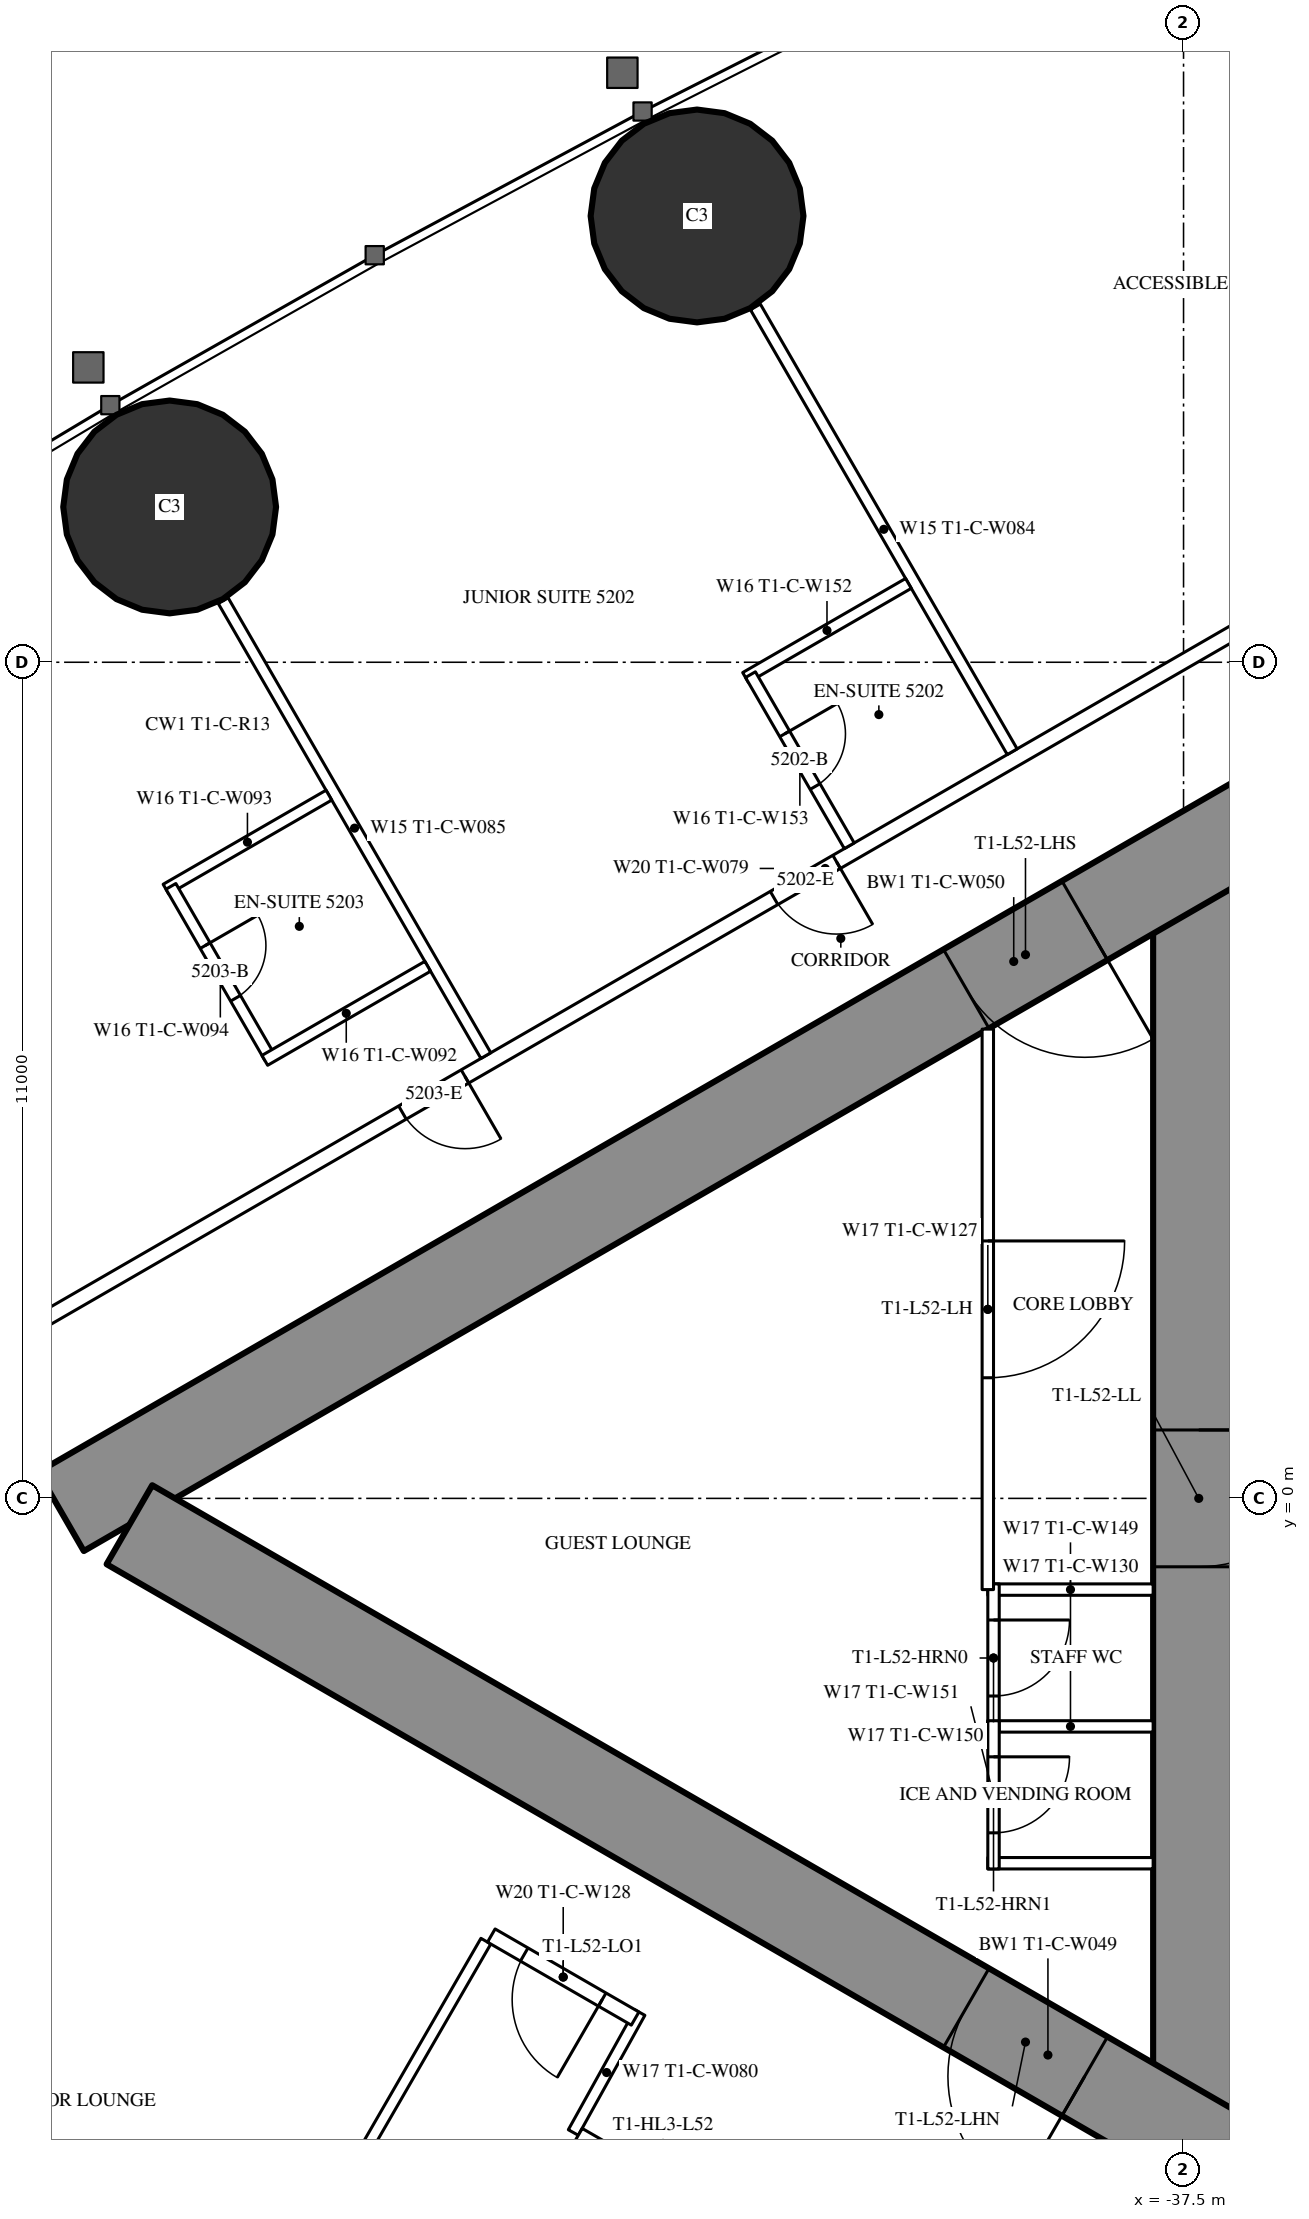
"""IFC4 building model, lengths in metres.
Left out: names, types, materials, properties, quantities, classifications, styles, units other than length and angle.
Written with IfcOpenShell. Run it as: python <this file> out.ifc"""

import sys

from ifc_helpers import new_model, si_unit, direction, frame, frame_2d, origin, origin_2d, place, context, subcontext, project, spatial, rectangle, circle, extrude, element, fill, save


model = new_model("IFC4")
c1 = context("Model", 3, precision=1e-05, world=origin(), true_north=direction((0.0, 1.0)))
c2 = subcontext(c1, "Body", "Model", "MODEL_VIEW")
j1 = project(units=[si_unit("LENGTHUNIT", "METRE"), si_unit("PLANEANGLEUNIT", "RADIAN")], contexts=[c1])
p1 = place(None, origin())
s1 = spatial("IfcSite", under=j1, at=p1, CompositionType="ELEMENT")
p2 = place(p1, origin())
s2 = spatial("IfcBuilding", under=s1, at=p2, CompositionType="ELEMENT")
p3 = place(p2, frame((0.0, 0.0, 194.8)))
s3 = spatial("IfcBuildingStorey", under=s2, at=p3, CompositionType="ELEMENT", Elevation=194.8)
for number, where, z_axis, x_axis in (
    (1, (-43.9, 16.871, 0.0), (0.0, 0.0, 1.0), (1.0, 0.0, 0.0)),
    (2, (-50.839, 13.043, 0.0), (0.0, 0.0, 1.0), (1.0, 0.0, 0.0)),
):
    element("IfcColumn", number, at=place(p3, frame(where, z_axis=z_axis, x_axis=x_axis)), inside=s3, PredefinedType="COLUMN", context=c2, shape_type="SweptSolid", body=[
        extrude(circle(Radius=1.4, at=origin_2d()), origin(), (0.0, 0.0, 1.0), 3.5),
    ])
p4 = place(p3, frame((-37.3, 8.6, 0.0), z_axis=(0.0, 0.0, 1.0), x_axis=(0.0, -1.0, 0.0)))
e3 = element("IfcWall", 3, at=p4, inside=s3, PredefinedType="SHEAR", context=c2, shape_type="SweptSolid", body=[
    extrude(rectangle(XDim=17.2, YDim=1.2, at=frame_2d((8.6, 0.0))), origin(), (0.0, 0.0, 1.0), 3.5),
])
p5 = place(p4, frame((7.7, 0.0, 0.0)))
e4 = element("IfcOpeningElement", 4, at=p5, cuts=e3, PredefinedType="OPENING", context=c2, shape_type="SweptSolid", body=[
    extrude(rectangle(XDim=1.8, YDim=2.2, at=frame_2d((0.9, 1.1))), frame((0.0, 0.61, 0.0), z_axis=(0.0, -1.0, 0.0), x_axis=(1.0, 0.0, 0.0)), (0.0, 0.0, 1.0), 1.22),
])
p6 = place(p3, frame((-27.2, 14.3, 0.0), z_axis=(0.0, 0.0, 1.0), x_axis=(-0.866026593062, -0.499997940104, 0.0)))
e5 = element("IfcWall", 5, at=p6, inside=s3, PredefinedType="SHEAR", context=c2, shape_type="SweptSolid", body=[
    extrude(rectangle(XDim=28.946, YDim=1.2, at=frame_2d((14.473, 0.0))), origin(), (0.0, 0.0, 1.0), 3.5),
])
p7 = place(p6, frame((4.6, 0.0, 0.0)))
e6 = element("IfcOpeningElement", 6, at=p7, cuts=e5, PredefinedType="OPENING", context=c2, shape_type="SweptSolid", body=[
    extrude(rectangle(XDim=1.0, YDim=2.2, at=frame_2d((0.5, 1.1))), frame((0.0, 0.61, 0.0), z_axis=(0.0, -1.0, 0.0), x_axis=(1.0, 0.0, 0.0)), (0.0, 0.0, 1.0), 1.22),
])
p8 = place(p6, frame((13.395, 0.0, 0.0)))
e7 = element("IfcOpeningElement", 7, at=p8, cuts=e5, PredefinedType="OPENING", context=c2, shape_type="SweptSolid", body=[
    extrude(rectangle(XDim=1.8, YDim=2.2, at=frame_2d((0.9, 1.1))), frame((0.0, 0.61, 0.0), z_axis=(0.0, -1.0, 0.0), x_axis=(1.0, 0.0, 0.0)), (0.0, 0.0, 1.0), 1.22),
])
p9 = place(p3, frame((-27.2, -14.3, 0.0), z_axis=(0.0, 0.0, 1.0), x_axis=(-0.866024021859, 0.500002393557, 0.0)))
e8 = element("IfcWall", 8, at=p9, inside=s3, PredefinedType="SHEAR", context=c2, shape_type="SweptSolid", body=[
    extrude(rectangle(XDim=27.907, YDim=1.2, at=frame_2d((13.954, 0.0))), origin(), (0.0, 0.0, 1.0), 3.5),
])
p10 = place(p9, frame((4.6, 0.0, 0.0)))
e9 = element("IfcOpeningElement", 9, at=p10, cuts=e8, PredefinedType="OPENING", context=c2, shape_type="SweptSolid", body=[
    extrude(rectangle(XDim=1.0, YDim=2.2, at=frame_2d((0.5, 1.1))), frame((0.0, 0.61, 0.0), z_axis=(0.0, -1.0, 0.0), x_axis=(1.0, 0.0, 0.0)), (0.0, 0.0, 1.0), 1.22),
])
p11 = place(p9, frame((13.395, 0.0, 0.0)))
e10 = element("IfcOpeningElement", 10, at=p11, cuts=e8, PredefinedType="OPENING", context=c2, shape_type="SweptSolid", body=[
    extrude(rectangle(XDim=1.8, YDim=2.2, at=frame_2d((0.9, 1.1))), frame((0.0, 0.61, 0.0), z_axis=(0.0, -1.0, 0.0), x_axis=(1.0, 0.0, 0.0)), (0.0, 0.0, 1.0), 1.22),
])
p12 = place(p3, frame((-27.86, 16.575, 0.0), z_axis=(0.0, 0.0, 1.0), x_axis=(-0.866025533911, -0.499999774615, 0.0)))
e11 = element("IfcWall", 11, at=p12, inside=s3, PredefinedType="PARTITIONING", context=c2, shape_type="SweptSolid", body=[
    extrude(rectangle(XDim=33.149, YDim=0.2, at=frame_2d((16.575, 0.0))), origin(), (0.0, 0.0, 1.0), 3.25),
])
p13 = place(p12, frame((3.75, 0.0, 0.0)))
e12 = element("IfcOpeningElement", 12, at=p13, cuts=e11, PredefinedType="OPENING", context=c2, shape_type="SweptSolid", body=[
    extrude(rectangle(XDim=1.0, YDim=2.2, at=frame_2d((0.5, 1.1))), frame((0.0, 0.11, 0.0), z_axis=(0.0, -1.0, 0.0), x_axis=(1.0, 0.0, 0.0)), (0.0, 0.0, 1.0), 0.22),
])
p14 = place(p12, frame((16.402, 0.0, 0.0)))
e13 = element("IfcOpeningElement", 13, at=p14, cuts=e11, PredefinedType="OPENING", context=c2, shape_type="SweptSolid", body=[
    extrude(rectangle(XDim=0.95, YDim=2.2, at=frame_2d((0.475, 1.1))), frame((0.0, 0.11, 0.0), z_axis=(0.0, -1.0, 0.0), x_axis=(1.0, 0.0, 0.0)), (0.0, 0.0, 1.0), 0.22),
])
p15 = place(p12, frame((22.047, 0.0, 0.0)))
e14 = element("IfcOpeningElement", 14, at=p15, cuts=e11, PredefinedType="OPENING", context=c2, shape_type="SweptSolid", body=[
    extrude(rectangle(XDim=0.95, YDim=2.2, at=frame_2d((0.475, 1.1))), frame((0.0, 0.11, 0.0), z_axis=(0.0, -1.0, 0.0), x_axis=(1.0, 0.0, 0.0)), (0.0, 0.0, 1.0), 0.22),
])
p16 = place(p12, frame((30.396, 0.0, 0.0)))
e15 = element("IfcOpeningElement", 15, at=p16, cuts=e11, PredefinedType="OPENING", context=c2, shape_type="SweptSolid", body=[
    extrude(rectangle(XDim=1.8, YDim=2.2, at=frame_2d((0.9, 1.1))), frame((0.0, 0.11, 0.0), z_axis=(0.0, -1.0, 0.0), x_axis=(1.0, 0.0, 0.0)), (0.0, 0.0, 1.0), 0.22),
])
p17 = place(p3, frame((-39.754, 9.823, 0.0), z_axis=(0.0, 0.0, 1.0), x_axis=(-0.499997670926, 0.866026748472, 0.0)))
e16 = element("IfcWall", 16, at=p17, inside=s3, PredefinedType="PARTITIONING", context=c2, shape_type="SweptSolid", body=[
    extrude(rectangle(XDim=6.757, YDim=0.15, at=frame_2d((3.379, 0.0))), origin(), (0.0, 0.0, 1.0), 2.3),
])
for number, where, z_axis, x_axis in (
    (17, (-46.679, 5.825, 0.0), (0.0, 0.0, 1.0), (-0.5, 0.866, 0.0)),
    (18, (-46.679, -5.825, 0.0), (0.0, 0.0, 1.0), (-0.5, -0.866, 0.0)),
):
    element("IfcWall", number, at=place(p3, frame(where, z_axis=z_axis, x_axis=x_axis)), inside=s3, PredefinedType="PARTITIONING", context=c2, shape_type="SweptSolid", body=[
        extrude(rectangle(XDim=6.911, YDim=0.15, at=frame_2d((3.456, 0.0))), origin(), (0.0, 0.0, 1.0), 2.3),
    ])
p18 = place(p3, frame((-44.652, -6.764, 0.0), z_axis=(0.0, 0.0, 1.0), x_axis=(-0.485424724123, -0.874278466629, 0.0)))
e19 = element("IfcWall", 19, at=p18, inside=s3, PredefinedType="PARTITIONING", context=c2, shape_type="SweptSolid", body=[
    extrude(rectangle(XDim=1.805, YDim=0.15, at=frame_2d((0.903, 0.0))), origin(), (0.0, 0.0, 1.0), 3.25),
])
p19 = place(p3, frame((-44.715, -6.844, 0.0), z_axis=(0.0, 0.0, 1.0), x_axis=(-0.865999496279, 0.500044870432, 0.0)))
e20 = element("IfcWall", 20, at=p19, inside=s3, PredefinedType="PARTITIONING", context=c2, shape_type="SweptSolid", body=[
    extrude(rectangle(XDim=2.185, YDim=0.2, at=frame_2d((1.092, 0.0))), origin(), (0.0, 0.0, 1.0), 3.25),
])
p20 = place(p19, frame((0.5, 0.0, 0.0)))
e21 = element("IfcOpeningElement", 21, at=p20, cuts=e20, PredefinedType="OPENING", context=c2, shape_type="SweptSolid", body=[
    extrude(rectangle(XDim=1.185, YDim=2.2, at=frame_2d((0.593, 1.1))), frame((0.0, 0.11, 0.0), z_axis=(0.0, -1.0, 0.0), x_axis=(1.0, 0.0, 0.0)), (0.0, 0.0, 1.0), 0.22),
])
p21 = place(p3, frame((-41.119, 12.037, 0.0), z_axis=(0.0, 0.0, 1.0), x_axis=(-0.866073894602, -0.499916002032, 0.0)))
e22 = element("IfcWall", 22, at=p21, inside=s3, PredefinedType="PARTITIONING", context=c2, shape_type="SweptSolid", body=[
    extrude(rectangle(XDim=2.475, YDim=0.15, at=frame_2d((1.238, 0.0))), origin(), (0.0, 0.0, 1.0), 3.25),
])
p22 = place(p3, frame((-41.898, 8.585, 0.0), z_axis=(0.0, 0.0, 1.0), x_axis=(-0.500006934395, 0.866021400173, 0.0)))
e23 = element("IfcWall", 23, at=p22, inside=s3, PredefinedType="PARTITIONING", context=c2, shape_type="SweptSolid", body=[
    extrude(rectangle(XDim=2.6, YDim=0.15, at=frame_2d((1.3, 0.0))), origin(), (0.0, 0.0, 1.0), 3.25),
])
p23 = place(p22, frame((0.9, 0.0, 0.0)))
e24 = element("IfcOpeningElement", 24, at=p23, cuts=e23, PredefinedType="OPENING", context=c2, shape_type="SweptSolid", body=[
    extrude(rectangle(XDim=0.8, YDim=2.2, at=frame_2d((0.4, 1.1))), frame((0.0, 0.085, 0.0), z_axis=(0.0, -1.0, 0.0), x_axis=(1.0, 0.0, 0.0)), (0.0, 0.0, 1.0), 0.17),
])
p24 = place(p3, frame((-48.744, 9.252, 0.0), z_axis=(0.0, 0.0, 1.0), x_axis=(-0.866006523861, -0.500032699561, 0.0)))
e25 = element("IfcWall", 25, at=p24, inside=s3, PredefinedType="PARTITIONING", context=c2, shape_type="SweptSolid", body=[
    extrude(rectangle(XDim=2.475, YDim=0.15, at=frame_2d((1.237, 0.0))), origin(), (0.0, 0.0, 1.0), 3.25),
])
p25 = place(p3, frame((-49.522, 5.8, 0.0), z_axis=(0.0, 0.0, 1.0), x_axis=(-0.500006934395, 0.866021400173, 0.0)))
e26 = element("IfcWall", 26, at=p25, inside=s3, PredefinedType="PARTITIONING", context=c2, shape_type="SweptSolid", body=[
    extrude(rectangle(XDim=2.6, YDim=0.15, at=frame_2d((1.3, 0.0))), origin(), (0.0, 0.0, 1.0), 3.25),
])
p26 = place(p25, frame((0.9, 0.0, 0.0)))
e27 = element("IfcOpeningElement", 27, at=p26, cuts=e26, PredefinedType="OPENING", context=c2, shape_type="SweptSolid", body=[
    extrude(rectangle(XDim=0.8, YDim=2.2, at=frame_2d((0.4, 1.1))), frame((0.0, 0.085, 0.0), z_axis=(0.0, -1.0, 0.0), x_axis=(1.0, 0.0, 0.0)), (0.0, 0.0, 1.0), 0.17),
])
p27 = place(p3, frame((-47.444, 7.0, 0.0), z_axis=(0.0, 0.0, 1.0), x_axis=(-0.866006523861, -0.500032699561, 0.0)))
e28 = element("IfcWall", 28, at=p27, inside=s3, PredefinedType="PARTITIONING", context=c2, shape_type="SweptSolid", body=[
    extrude(rectangle(XDim=2.475, YDim=0.15, at=frame_2d((1.237, 0.0))), origin(), (0.0, 0.0, 1.0), 3.25),
])
for number, where, z_axis, x_axis in (
    (29, (-37.9, -1.2, 0.0), (0.0, 0.0, 1.0), (-1.0, 0.0, 0.0)),
    (30, (-37.9, -3.0, 0.0), (0.0, 0.0, 1.0), (-1.0, 0.0, 0.0)),
    (31, (-37.9, -4.8, 0.0), (0.0, 0.0, 1.0), (-1.0, 0.0, 0.0)),
):
    element("IfcWall", number, at=place(p3, frame(where, z_axis=z_axis, x_axis=x_axis)), inside=s3, PredefinedType="PARTITIONING", context=c2, shape_type="SweptSolid", body=[
        extrude(rectangle(XDim=2.175, YDim=0.15, at=frame_2d((1.087, 0.0))), origin(), (0.0, 0.0, 1.0), 3.25),
    ])
p28 = place(p3, frame((-40.0, -1.125, 0.0), z_axis=(0.0, 0.0, 1.0), x_axis=(0.0, -1.0, 0.0)))
e32 = element("IfcWall", 32, at=p28, inside=s3, PredefinedType="PARTITIONING", context=c2, shape_type="SweptSolid", body=[
    extrude(rectangle(XDim=1.95, YDim=0.15, at=frame_2d((0.975, 0.0))), origin(), (0.0, 0.0, 1.0), 3.25),
])
p29 = place(p28, frame((0.475, 0.0, 0.0)))
e33 = element("IfcOpeningElement", 33, at=p29, cuts=e32, PredefinedType="OPENING", context=c2, shape_type="SweptSolid", body=[
    extrude(rectangle(XDim=1.0, YDim=2.2, at=frame_2d((0.5, 1.1))), frame((0.0, 0.085, 0.0), z_axis=(0.0, -1.0, 0.0), x_axis=(1.0, 0.0, 0.0)), (0.0, 0.0, 1.0), 0.17),
])
p30 = place(p3, frame((-40.0, -2.925, 0.0), z_axis=(0.0, 0.0, 1.0), x_axis=(0.0, -1.0, 0.0)))
e34 = element("IfcWall", 34, at=p30, inside=s3, PredefinedType="PARTITIONING", context=c2, shape_type="SweptSolid", body=[
    extrude(rectangle(XDim=1.95, YDim=0.15, at=frame_2d((0.975, 0.0))), origin(), (0.0, 0.0, 1.0), 3.25),
])
p31 = place(p30, frame((0.475, 0.0, 0.0)))
e35 = element("IfcOpeningElement", 35, at=p31, cuts=e34, PredefinedType="OPENING", context=c2, shape_type="SweptSolid", body=[
    extrude(rectangle(XDim=1.0, YDim=2.2, at=frame_2d((0.5, 1.1))), frame((0.0, 0.085, 0.0), z_axis=(0.0, -1.0, 0.0), x_axis=(1.0, 0.0, 0.0)), (0.0, 0.0, 1.0), 0.17),
])
p32 = place(p3, frame((-40.075, 6.174, 0.0), z_axis=(0.0, 0.0, 1.0), x_axis=(0.0, -1.0, 0.0)))
e36 = element("IfcWall", 36, at=p32, inside=s3, PredefinedType="PARTITIONING", context=c2, shape_type="SweptSolid", body=[
    extrude(rectangle(XDim=7.374, YDim=0.15, at=frame_2d((3.687, 0.0))), origin(), (0.0, 0.0, 1.0), 3.25),
])
p33 = place(p32, frame((2.787, 0.0, 0.0)))
e37 = element("IfcOpeningElement", 37, at=p33, cuts=e36, PredefinedType="OPENING", context=c2, shape_type="SweptSolid", body=[
    extrude(rectangle(XDim=1.8, YDim=2.2, at=frame_2d((0.9, 1.1))), frame((0.0, 0.085, 0.0), z_axis=(0.0, -1.0, 0.0), x_axis=(1.0, 0.0, 0.0)), (0.0, 0.0, 1.0), 0.17),
])
p34 = place(p3, frame((-39.758, -11.697, 0.0), z_axis=(0.0, 0.0, 1.0), x_axis=(-0.866024194504, 0.500002094529, 0.0)))
e38 = element("IfcWall", 38, at=p34, inside=s3, PredefinedType="PARTITIONING", context=c2, shape_type="SweptSolid", body=[
    extrude(rectangle(XDim=6.6, YDim=0.25, at=frame_2d((3.3, 0.0))), origin(), (0.0, 0.0, 1.0), 3.25),
])
p35 = place(p34, frame((0.75, 0.0, 0.0)))
e39 = element("IfcOpeningElement", 39, at=p35, cuts=e38, PredefinedType="OPENING", context=c2, shape_type="SweptSolid", body=[
    extrude(rectangle(XDim=1.1, YDim=2.2, at=frame_2d((0.55, 1.1))), frame((0.0, 0.135, 0.0), z_axis=(0.0, -1.0, 0.0), x_axis=(1.0, 0.0, 0.0)), (0.0, 0.0, 1.0), 0.27),
])
p36 = place(p34, frame((2.75, 0.0, 0.0)))
e40 = element("IfcOpeningElement", 40, at=p36, cuts=e38, PredefinedType="OPENING", context=c2, shape_type="SweptSolid", body=[
    extrude(rectangle(XDim=1.1, YDim=2.2, at=frame_2d((0.55, 1.1))), frame((0.0, 0.135, 0.0), z_axis=(0.0, -1.0, 0.0), x_axis=(1.0, 0.0, 0.0)), (0.0, 0.0, 1.0), 0.27),
])
p37 = place(p34, frame((4.75, 0.0, 0.0)))
e41 = element("IfcOpeningElement", 41, at=p37, cuts=e38, PredefinedType="OPENING", context=c2, shape_type="SweptSolid", body=[
    extrude(rectangle(XDim=1.1, YDim=2.2, at=frame_2d((0.55, 1.1))), frame((0.0, 0.135, 0.0), z_axis=(0.0, -1.0, 0.0), x_axis=(1.0, 0.0, 0.0)), (0.0, 0.0, 1.0), 0.27),
])
p38 = place(p23, origin())
e42 = element("IfcDoor", 42, at=p38, inside=s3, OperationType="SINGLE_SWING_RIGHT", PredefinedType="DOOR", context=c2, shape_type="SweptSolid", body=[
    extrude(rectangle(XDim=0.8, YDim=2.2, at=frame_2d((0.4, 1.1))), frame((0.0, 0.025, 0.0), z_axis=(0.0, -1.0, 0.0), x_axis=(1.0, 0.0, 0.0)), (0.0, 0.0, 1.0), 0.05),
])
fill(e24, e42)
p39 = place(p14, origin())
e43 = element("IfcDoor", 43, at=p39, inside=s3, OperationType="SINGLE_SWING_LEFT", PredefinedType="DOOR", context=c2, shape_type="SweptSolid", body=[
    extrude(rectangle(XDim=0.95, YDim=2.2, at=frame_2d((0.475, 1.1))), frame((0.0, 0.025, 0.0), z_axis=(0.0, -1.0, 0.0), x_axis=(1.0, 0.0, 0.0)), (0.0, 0.0, 1.0), 0.05),
])
fill(e13, e43)
p40 = place(p26, origin())
e44 = element("IfcDoor", 44, at=p40, inside=s3, OperationType="SINGLE_SWING_RIGHT", PredefinedType="DOOR", context=c2, shape_type="SweptSolid", body=[
    extrude(rectangle(XDim=0.8, YDim=2.2, at=frame_2d((0.4, 1.1))), frame((0.0, 0.025, 0.0), z_axis=(0.0, -1.0, 0.0), x_axis=(1.0, 0.0, 0.0)), (0.0, 0.0, 1.0), 0.05),
])
fill(e27, e44)
p41 = place(p15, origin())
e45 = element("IfcDoor", 45, at=p41, inside=s3, OperationType="SINGLE_SWING_LEFT", PredefinedType="DOOR", context=c2, shape_type="SweptSolid", body=[
    extrude(rectangle(XDim=0.95, YDim=2.2, at=frame_2d((0.475, 1.1))), frame((0.0, 0.025, 0.0), z_axis=(0.0, -1.0, 0.0), x_axis=(1.0, 0.0, 0.0)), (0.0, 0.0, 1.0), 0.05),
])
fill(e14, e45)
p42 = place(p20, origin())
e46 = element("IfcDoor", 46, at=p42, inside=s3, OperationType="SINGLE_SWING_LEFT", PredefinedType="DOOR", context=c2, shape_type="SweptSolid", body=[
    extrude(rectangle(XDim=1.185, YDim=2.2, at=frame_2d((0.593, 1.1))), frame((0.0, 0.025, 0.0), z_axis=(0.0, -1.0, 0.0), x_axis=(1.0, 0.0, 0.0)), (0.0, 0.0, 1.0), 0.05),
])
fill(e21, e46)
p43 = place(p29, origin())
e47 = element("IfcDoor", 47, at=p43, inside=s3, OperationType="SINGLE_SWING_LEFT", PredefinedType="DOOR", context=c2, shape_type="SweptSolid", body=[
    extrude(rectangle(XDim=1.0, YDim=2.2, at=frame_2d((0.5, 1.1))), frame((0.0, 0.025, 0.0), z_axis=(0.0, -1.0, 0.0), x_axis=(1.0, 0.0, 0.0)), (0.0, 0.0, 1.0), 0.05),
])
fill(e33, e47)
p44 = place(p31, origin())
e48 = element("IfcDoor", 48, at=p44, inside=s3, OperationType="SINGLE_SWING_LEFT", PredefinedType="DOOR", context=c2, shape_type="SweptSolid", body=[
    extrude(rectangle(XDim=1.0, YDim=2.2, at=frame_2d((0.5, 1.1))), frame((0.0, 0.025, 0.0), z_axis=(0.0, -1.0, 0.0), x_axis=(1.0, 0.0, 0.0)), (0.0, 0.0, 1.0), 0.05),
])
fill(e35, e48)
p45 = place(p33, origin())
e49 = element("IfcDoor", 49, at=p45, inside=s3, OperationType="DOUBLE_DOOR_SINGLE_SWING", PredefinedType="DOOR", context=c2, shape_type="SweptSolid", body=[
    extrude(rectangle(XDim=1.8, YDim=2.2, at=frame_2d((0.9, 1.1))), frame((0.0, 0.025, 0.0), z_axis=(0.0, -1.0, 0.0), x_axis=(1.0, 0.0, 0.0)), (0.0, 0.0, 1.0), 0.05),
])
fill(e37, e49)
p46 = place(p8, origin())
e50 = element("IfcDoor", 50, at=p46, inside=s3, OperationType="DOUBLE_DOOR_SINGLE_SWING", PredefinedType="DOOR", context=c2, shape_type="SweptSolid", body=[
    extrude(rectangle(XDim=1.8, YDim=2.2, at=frame_2d((0.9, 1.1))), frame((0.0, 0.025, 0.0), z_axis=(0.0, -1.0, 0.0), x_axis=(1.0, 0.0, 0.0)), (0.0, 0.0, 1.0), 0.05),
])
fill(e7, e50)
p47 = place(p11, origin())
e51 = element("IfcDoor", 51, at=p47, inside=s3, OperationType="DOUBLE_DOOR_SINGLE_SWING", PredefinedType="DOOR", context=c2, shape_type="SweptSolid", body=[
    extrude(rectangle(XDim=1.8, YDim=2.2, at=frame_2d((0.9, 1.1))), frame((0.0, 0.025, 0.0), z_axis=(0.0, -1.0, 0.0), x_axis=(1.0, 0.0, 0.0)), (0.0, 0.0, 1.0), 0.05),
])
fill(e10, e51)
p48 = place(p5, origin())
e52 = element("IfcDoor", 52, at=p48, inside=s3, OperationType="DOUBLE_DOOR_SINGLE_SWING", PredefinedType="DOOR", context=c2, shape_type="SweptSolid", body=[
    extrude(rectangle(XDim=1.8, YDim=2.2, at=frame_2d((0.9, 1.1))), frame((0.0, 0.025, 0.0), z_axis=(0.0, -1.0, 0.0), x_axis=(1.0, 0.0, 0.0)), (0.0, 0.0, 1.0), 0.05),
])
fill(e4, e52)
save(model, sys.argv[1])
